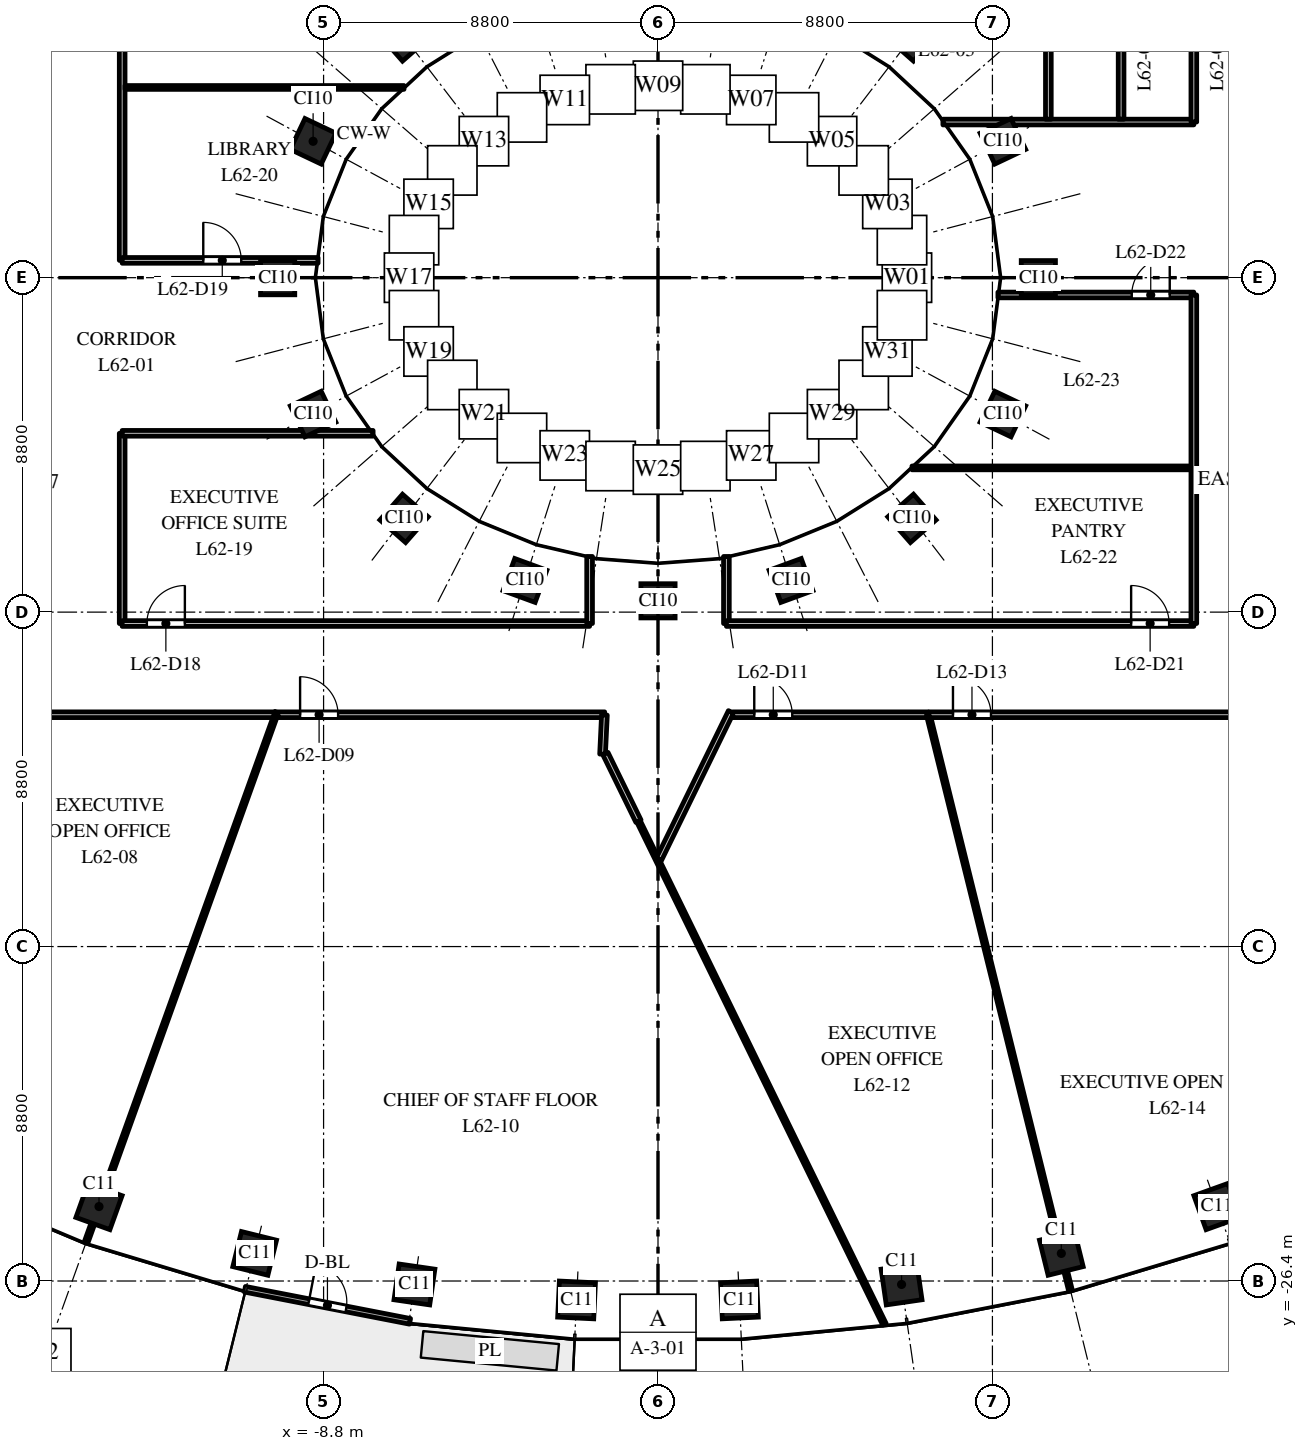
"""IFC4 building model, lengths in metres.
Left out: names, types, materials, properties, quantities, classifications, styles, units other than length and angle.
Written with IfcOpenShell. Run it as: python <this file> out.ifc"""

import sys

from ifc_helpers import new_model, si_unit, direction, frame, frame_2d, origin, origin_2d, place, context, subcontext, project, spatial, rectangle, extrude, element, fill, save


model = new_model("IFC4")
c1 = context("Model", 3, precision=1e-05, world=origin(), true_north=direction((0.0, 1.0)))
c2 = subcontext(c1, "Body", "Model", "MODEL_VIEW")
j1 = project(units=[si_unit("LENGTHUNIT", "METRE"), si_unit("PLANEANGLEUNIT", "RADIAN")], contexts=[c1])
p1 = place(None, origin())
s1 = spatial("IfcSite", under=j1, at=p1, CompositionType="ELEMENT")
p2 = place(p1, origin())
s2 = spatial("IfcBuilding", under=s1, at=p2, CompositionType="ELEMENT")
p3 = place(p2, frame((0.0, 0.0, 291.0)))
s3 = spatial("IfcBuildingStorey", under=s2, at=p3, CompositionType="ELEMENT", Elevation=291.0)
for number, where, z_axis, x_axis in (
    (1, (-14.709, -24.441, 0.0), (0.0, 0.0, 1.0), (0.941, -0.338, 0.0)),
    (2, (-10.613, -25.674, 0.0), (0.0, 0.0, 1.0), (0.971, -0.24, 0.0)),
    (3, (-6.409, -26.491, 0.0), (0.0, 0.0, 1.0), (0.99, -0.143, 0.0)),
    (4, (-2.143, -26.898, 0.0), (0.0, 0.0, 1.0), (0.999, -0.048, 0.0)),
    (5, (2.143, -26.898, 0.0), (0.0, 0.0, 1.0), (0.999, 0.048, 0.0)),
    (6, (6.409, -26.491, 0.0), (0.0, 0.0, 1.0), (0.99, 0.143, 0.0)),
    (7, (10.613, -25.674, 0.0), (0.0, 0.0, 1.0), (0.971, 0.24, 0.0)),
    (8, (14.709, -24.441, 0.0), (0.0, 0.0, 1.0), (0.941, 0.338, 0.0)),
):
    element("IfcColumn", number, at=place(p3, frame(where, z_axis=z_axis, x_axis=x_axis)), inside=s3, PredefinedType="COLUMN", context=c2, shape_type="SweptSolid", body=[
        extrude(rectangle(XDim=0.95, YDim=0.95, at=origin_2d()), origin(), (0.0, 0.0, 1.0), 4.0),
    ])
for number, where, z_axis, x_axis in (
    (9, (10.008, 0.0, 0.0), (0.0, 0.0, 1.0), (0.0, 1.0, 0.0)),
    (10, (9.076, 3.588, 0.0), (0.0, 0.0, 1.0), (-0.429, 0.903, 0.0)),
    (11, (6.682, 6.334, 0.0), (0.0, 0.0, 1.0), (-0.751, 0.66, 0.0)),
    (12, (-6.682, 6.334, 0.0), (0.0, 0.0, 1.0), (-0.751, -0.66, 0.0)),
    (13, (-9.076, 3.588, 0.0), (0.0, 0.0, 1.0), (-0.429, -0.903, 0.0)),
    (14, (-10.008, 0.0, 0.0), (0.0, 0.0, 1.0), (0.0, -1.0, 0.0)),
    (15, (-9.076, -3.588, 0.0), (0.0, 0.0, 1.0), (0.429, -0.903, 0.0)),
    (16, (-6.682, -6.334, 0.0), (0.0, 0.0, 1.0), (0.751, -0.66, 0.0)),
    (17, (-3.501, -7.967, 0.0), (0.0, 0.0, 1.0), (0.939, -0.344, 0.0)),
    (18, (0.0, -8.503, 0.0), (0.0, 0.0, 1.0), (1.0, 0.0, 0.0)),
    (19, (3.501, -7.967, 0.0), (0.0, 0.0, 1.0), (0.939, 0.344, 0.0)),
    (20, (6.682, -6.334, 0.0), (0.0, 0.0, 1.0), (0.751, 0.66, 0.0)),
    (21, (9.076, -3.588, 0.0), (0.0, 0.0, 1.0), (0.429, 0.903, 0.0)),
):
    element("IfcColumn", number, at=place(p3, frame(where, z_axis=z_axis, x_axis=x_axis)), inside=s3, PredefinedType="COLUMN", context=c2, shape_type="SweptSolid", body=[
        extrude(rectangle(XDim=0.9, YDim=0.9, at=origin_2d()), origin(), (0.0, 0.0, 1.0), 4.0),
    ])
p4 = place(p3, frame((-10.871, -26.617, 0.0), z_axis=(0.0, 0.0, 1.0), x_axis=(0.981631174778, -0.190788460615, 0.0)))
e22 = element("IfcWall", 22, at=p4, inside=s3, PredefinedType="STANDARD", context=c2, shape_type="SweptSolid", body=[
    extrude(rectangle(XDim=4.426, YDim=0.15, at=frame_2d((2.213, 0.0))), origin(), (0.0, 0.0, 1.0), 3.7),
])
p5 = place(p4, frame((1.713, 0.0, 0.0)))
e23 = element("IfcOpeningElement", 23, at=p5, cuts=e22, PredefinedType="OPENING", context=c2, shape_type="SweptSolid", body=[
    extrude(rectangle(XDim=1.0, YDim=2.4, at=frame_2d((0.5, 1.2))), frame((0.0, 0.085, 0.0), z_axis=(0.0, -1.0, 0.0), x_axis=(1.0, 0.0, 0.0)), (0.0, 0.0, 1.0), 0.17),
])
p6 = place(p3, frame((-31.5, -11.5, 0.0), z_axis=(0.0, 0.0, 1.0), x_axis=(1.0, 0.0, 0.0)))
e24 = element("IfcWall", 24, at=p6, inside=s3, PredefinedType="PARTITIONING", context=c2, shape_type="SweptSolid", body=[
    extrude(rectangle(XDim=21.432, YDim=0.15, at=frame_2d((10.716, 0.0))), origin(), (0.0, 0.0, 1.0), 2.75),
])
p7 = place(p6, frame((9.15, 0.0, 0.0)))
e25 = element("IfcOpeningElement", 25, at=p7, cuts=e24, PredefinedType="OPENING", context=c2, shape_type="SweptSolid", body=[
    extrude(rectangle(XDim=1.0, YDim=2.1, at=frame_2d((0.5, 1.05))), frame((0.0, 0.085, 0.0), z_axis=(0.0, -1.0, 0.0), x_axis=(1.0, 0.0, 0.0)), (0.0, 0.0, 1.0), 0.17),
])
p8 = place(p6, frame((12.021, 0.0, 0.0)))
e26 = element("IfcOpeningElement", 26, at=p8, cuts=e24, PredefinedType="OPENING", context=c2, shape_type="SweptSolid", body=[
    extrude(rectangle(XDim=1.0, YDim=2.1, at=frame_2d((0.5, 1.05))), frame((0.0, 0.085, 0.0), z_axis=(0.0, -1.0, 0.0), x_axis=(1.0, 0.0, 0.0)), (0.0, 0.0, 1.0), 0.17),
])
p9 = place(p3, frame((-15.049, -25.383, 0.0), z_axis=(0.0, 0.0, 1.0), x_axis=(0.338454781071, 0.94098265721, 0.0)))
e27 = element("IfcWall", 27, at=p9, inside=s3, PredefinedType="PARTITIONING", context=c2, shape_type="SweptSolid", body=[
    extrude(rectangle(XDim=14.829, YDim=0.1, at=frame_2d((7.415, 0.0))), origin(), (0.0, 0.0, 1.0), 2.75),
])
p10 = place(p3, frame((-14.1, -9.1, 0.0), z_axis=(0.0, 0.0, 1.0), x_axis=(0.0, 1.0, 0.0)))
e28 = element("IfcWall", 28, at=p10, inside=s3, PredefinedType="PARTITIONING", context=c2, shape_type="SweptSolid", body=[
    extrude(rectangle(XDim=5.005, YDim=0.15, at=frame_2d((2.502, 0.0))), origin(), (0.0, 0.0, 1.0), 3.7),
])
p11 = place(p3, frame((-14.1, -9.1, 0.0), z_axis=(0.0, 0.0, 1.0), x_axis=(1.0, 0.0, 0.0)))
e29 = element("IfcWall", 29, at=p11, inside=s3, PredefinedType="PARTITIONING", context=c2, shape_type="SweptSolid", body=[
    extrude(rectangle(XDim=12.3, YDim=0.15, at=frame_2d((6.15, 0.0))), origin(), (0.0, 0.0, 1.0), 2.75),
])
p12 = place(p11, frame((0.65, 0.0, 0.0)))
e30 = element("IfcOpeningElement", 30, at=p12, cuts=e29, PredefinedType="OPENING", context=c2, shape_type="SweptSolid", body=[
    extrude(rectangle(XDim=1.0, YDim=2.1, at=frame_2d((0.5, 1.05))), frame((0.0, 0.085, 0.0), z_axis=(0.0, -1.0, 0.0), x_axis=(1.0, 0.0, 0.0)), (0.0, 0.0, 1.0), 0.17),
])
p13 = place(p3, frame((-14.1, -4.095, 0.0), z_axis=(0.0, 0.0, 1.0), x_axis=(1.0, 0.0, 0.0)))
e31 = element("IfcWall", 31, at=p13, inside=s3, PredefinedType="PARTITIONING", context=c2, shape_type="SweptSolid", body=[
    extrude(rectangle(XDim=6.603, YDim=0.15, at=frame_2d((3.302, 0.0))), origin(), (0.0, 0.0, 1.0), 3.0),
])
p14 = place(p3, frame((-14.1, 0.455, 0.0), z_axis=(0.0, 0.0, 1.0), x_axis=(0.0, 1.0, 0.0)))
e32 = element("IfcWall", 32, at=p14, inside=s3, PredefinedType="PARTITIONING", context=c2, shape_type="SweptSolid", body=[
    extrude(rectangle(XDim=8.645, YDim=0.15, at=frame_2d((4.323, 0.0))), origin(), (0.0, 0.0, 1.0), 3.7),
])
p15 = place(p3, frame((-14.1, 0.455, 0.0), z_axis=(0.0, 0.0, 1.0), x_axis=(1.0, 0.0, 0.0)))
e33 = element("IfcWall", 33, at=p15, inside=s3, PredefinedType="PARTITIONING", context=c2, shape_type="SweptSolid", body=[
    extrude(rectangle(XDim=5.155, YDim=0.15, at=frame_2d((2.578, 0.0))), origin(), (0.0, 0.0, 1.0), 3.0),
])
p16 = place(p15, frame((2.134, 0.0, 0.0)))
e34 = element("IfcOpeningElement", 34, at=p16, cuts=e33, PredefinedType="OPENING", context=c2, shape_type="SweptSolid", body=[
    extrude(rectangle(XDim=1.0, YDim=2.1, at=frame_2d((0.5, 1.05))), frame((0.0, 0.085, 0.0), z_axis=(0.0, -1.0, 0.0), x_axis=(1.0, 0.0, 0.0)), (0.0, 0.0, 1.0), 0.17),
])
p17 = place(p3, frame((-14.025, 5.005, 0.0), z_axis=(0.0, 0.0, 1.0), x_axis=(1.0, 0.0, 0.0)))
e35 = element("IfcWall", 35, at=p17, inside=s3, PredefinedType="PARTITIONING", context=c2, shape_type="SweptSolid", body=[
    extrude(rectangle(XDim=7.341, YDim=0.1, at=frame_2d((3.67, 0.0))), origin(), (0.0, 0.0, 1.0), 3.0),
])
p18 = place(p3, frame((-10.003, -11.5, 0.0), z_axis=(0.0, 0.0, 1.0), x_axis=(1.0, 0.0, 0.0)))
e36 = element("IfcWall", 36, at=p18, inside=s3, PredefinedType="PARTITIONING", context=c2, shape_type="SweptSolid", body=[
    extrude(rectangle(XDim=8.6, YDim=0.15, at=frame_2d((4.3, 0.0))), origin(), (0.0, 0.0, 1.0), 2.75),
])
p19 = place(p18, frame((0.585, 0.0, 0.0)))
e37 = element("IfcOpeningElement", 37, at=p19, cuts=e36, PredefinedType="OPENING", context=c2, shape_type="SweptSolid", body=[
    extrude(rectangle(XDim=1.0, YDim=2.1, at=frame_2d((0.5, 1.05))), frame((0.0, 0.085, 0.0), z_axis=(0.0, -1.0, 0.0), x_axis=(1.0, 0.0, 0.0)), (0.0, 0.0, 1.0), 0.17),
])
p20 = place(p3, frame((-1.8, -9.1, 0.0), z_axis=(0.0, 0.0, 1.0), x_axis=(0.0, 1.0, 0.0)))
e38 = element("IfcWall", 38, at=p20, inside=s3, PredefinedType="PARTITIONING", context=c2, shape_type="SweptSolid", body=[
    extrude(rectangle(XDim=1.764, YDim=0.15, at=frame_2d((0.882, 0.0))), origin(), (0.0, 0.0, 1.0), 3.0),
])
p21 = place(p3, frame((-1.459, -12.538, 0.0), z_axis=(0.0, 0.0, 1.0), x_axis=(0.047542673634, 0.998869207746, 0.0)))
e39 = element("IfcWall", 39, at=p21, inside=s3, PredefinedType="PARTITIONING", context=c2, shape_type="SweptSolid", body=[
    extrude(rectangle(XDim=1.032, YDim=0.15, at=frame_2d((0.516, 0.0))), origin(), (0.0, 0.0, 1.0), 3.7),
])
p22 = place(p3, frame((-1.384, -12.522, 0.0), z_axis=(0.0, 0.0, 1.0), x_axis=(0.439356052892, -0.898313007134, 0.0)))
e40 = element("IfcWall", 40, at=p22, inside=s3, PredefinedType="PARTITIONING", context=c2, shape_type="SweptSolid", body=[
    extrude(rectangle(XDim=1.98, YDim=0.15, at=frame_2d((0.99, 0.0))), origin(), (0.0, 0.0, 1.0), 2.85),
])
p23 = place(p3, frame((-0.511, -14.307, 0.0), z_axis=(0.0, 0.0, 1.0), x_axis=(0.439232430121, -0.898373459275, 0.0)))
e41 = element("IfcWall", 41, at=p23, inside=s3, PredefinedType="PARTITIONING", context=c2, shape_type="SweptSolid", body=[
    extrude(rectangle(XDim=14.728, YDim=0.1, at=frame_2d((7.364, 0.0))), origin(), (0.0, 0.0, 1.0), 3.0),
])
p24 = place(p3, frame((0.022, -15.308, 0.0), z_axis=(0.0, 0.0, 1.0), x_axis=(0.439129080874, 0.898423981387, 0.0)))
e42 = element("IfcWall", 42, at=p24, inside=s3, PredefinedType="PARTITIONING", context=c2, shape_type="SweptSolid", body=[
    extrude(rectangle(XDim=4.322, YDim=0.15, at=frame_2d((2.161, 0.0))), origin(), (0.0, 0.0, 1.0), 3.7),
])
p25 = place(p3, frame((1.8, -9.1, 0.0), z_axis=(0.0, 0.0, 1.0), x_axis=(0.0, 1.0, 0.0)))
e43 = element("IfcWall", 43, at=p25, inside=s3, PredefinedType="PARTITIONING", context=c2, shape_type="SweptSolid", body=[
    extrude(rectangle(XDim=1.764, YDim=0.15, at=frame_2d((0.882, 0.0))), origin(), (0.0, 0.0, 1.0), 3.0),
])
p26 = place(p3, frame((1.8, -9.1, 0.0), z_axis=(0.0, 0.0, 1.0), x_axis=(1.0, 0.0, 0.0)))
e44 = element("IfcWall", 44, at=p26, inside=s3, PredefinedType="PARTITIONING", context=c2, shape_type="SweptSolid", body=[
    extrude(rectangle(XDim=12.3, YDim=0.15, at=frame_2d((6.15, 0.0))), origin(), (0.0, 0.0, 1.0), 2.85),
])
p27 = place(p26, frame((10.65, 0.0, 0.0)))
e45 = element("IfcOpeningElement", 45, at=p27, cuts=e44, PredefinedType="OPENING", context=c2, shape_type="SweptSolid", body=[
    extrude(rectangle(XDim=1.0, YDim=2.1, at=frame_2d((0.5, 1.05))), frame((0.0, 0.085, 0.0), z_axis=(0.0, -1.0, 0.0), x_axis=(1.0, 0.0, 0.0)), (0.0, 0.0, 1.0), 0.17),
])
p28 = place(p3, frame((1.966, -11.5, 0.0), z_axis=(0.0, 0.0, 1.0), x_axis=(1.0, 0.0, 0.0)))
e46 = element("IfcWall", 46, at=p28, inside=s3, PredefinedType="PARTITIONING", context=c2, shape_type="SweptSolid", body=[
    extrude(rectangle(XDim=5.146, YDim=0.15, at=frame_2d((2.573, 0.0))), origin(), (0.0, 0.0, 1.0), 2.85),
])
p29 = place(p28, frame((0.567, 0.0, 0.0)))
e47 = element("IfcOpeningElement", 47, at=p29, cuts=e46, PredefinedType="OPENING", context=c2, shape_type="SweptSolid", body=[
    extrude(rectangle(XDim=1.0, YDim=2.1, at=frame_2d((0.5, 1.05))), frame((0.0, 0.085, 0.0), z_axis=(0.0, -1.0, 0.0), x_axis=(1.0, 0.0, 0.0)), (0.0, 0.0, 1.0), 0.17),
])
p30 = place(p3, frame((6.684, -5.005, 0.0), z_axis=(0.0, 0.0, 1.0), x_axis=(1.0, 0.0, 0.0)))
e48 = element("IfcWall", 48, at=p30, inside=s3, PredefinedType="PARTITIONING", context=c2, shape_type="SweptSolid", body=[
    extrude(rectangle(XDim=7.341, YDim=0.1, at=frame_2d((3.67, 0.0))), origin(), (0.0, 0.0, 1.0), 2.75),
])
p31 = place(p3, frame((7.112, -11.5, 0.0), z_axis=(0.0, 0.0, 1.0), x_axis=(0.239787813873, -0.970825321218, 0.0)))
e49 = element("IfcWall", 49, at=p31, inside=s3, PredefinedType="PARTITIONING", context=c2, shape_type="SweptSolid", body=[
    extrude(rectangle(XDim=15.601, YDim=0.1, at=frame_2d((7.801, 0.0))), origin(), (0.0, 0.0, 1.0), 2.85),
])
p32 = place(p3, frame((7.129, -11.5, 0.0), z_axis=(0.0, 0.0, 1.0), x_axis=(1.0, 0.0, 0.0)))
e50 = element("IfcWall", 50, at=p32, inside=s3, PredefinedType="PARTITIONING", context=c2, shape_type="SweptSolid", body=[
    extrude(rectangle(XDim=24.371, YDim=0.15, at=frame_2d((12.186, 0.0))), origin(), (0.0, 0.0, 1.0), 2.75),
])
p33 = place(p32, frame((0.633, 0.0, 0.0)))
e51 = element("IfcOpeningElement", 51, at=p33, cuts=e50, PredefinedType="OPENING", context=c2, shape_type="SweptSolid", body=[
    extrude(rectangle(XDim=1.0, YDim=2.1, at=frame_2d((0.5, 1.05))), frame((0.0, 0.085, 0.0), z_axis=(0.0, -1.0, 0.0), x_axis=(1.0, 0.0, 0.0)), (0.0, 0.0, 1.0), 0.17),
])
p34 = place(p32, frame((10.195, 0.0, 0.0)))
e52 = element("IfcOpeningElement", 52, at=p34, cuts=e50, PredefinedType="OPENING", context=c2, shape_type="SweptSolid", body=[
    extrude(rectangle(XDim=1.0, YDim=2.1, at=frame_2d((0.5, 1.05))), frame((0.0, 0.085, 0.0), z_axis=(0.0, -1.0, 0.0), x_axis=(1.0, 0.0, 0.0)), (0.0, 0.0, 1.0), 0.17),
])
p35 = place(p3, frame((7.497, 4.095, 0.0), z_axis=(0.0, 0.0, 1.0), x_axis=(1.0, 0.0, 0.0)))
e53 = element("IfcWall", 53, at=p35, inside=s3, PredefinedType="PARTITIONING", context=c2, shape_type="SweptSolid", body=[
    extrude(rectangle(XDim=6.603, YDim=0.15, at=frame_2d((3.302, 0.0))), origin(), (0.0, 0.0, 1.0), 3.0),
])
p36 = place(p3, frame((8.945, -0.455, 0.0), z_axis=(0.0, 0.0, 1.0), x_axis=(1.0, 0.0, 0.0)))
e54 = element("IfcWall", 54, at=p36, inside=s3, PredefinedType="PARTITIONING", context=c2, shape_type="SweptSolid", body=[
    extrude(rectangle(XDim=5.155, YDim=0.15, at=frame_2d((2.578, 0.0))), origin(), (0.0, 0.0, 1.0), 3.0),
])
p37 = place(p36, frame((3.521, 0.0, 0.0)))
e55 = element("IfcOpeningElement", 55, at=p37, cuts=e54, PredefinedType="OPENING", context=c2, shape_type="SweptSolid", body=[
    extrude(rectangle(XDim=1.0, YDim=2.1, at=frame_2d((0.5, 1.05))), frame((0.0, 0.085, 0.0), z_axis=(0.0, -1.0, 0.0), x_axis=(1.0, 0.0, 0.0)), (0.0, 0.0, 1.0), 0.17),
])
for number, where, z_axis, x_axis in (
    (56, (10.272, 4.17, 0.0), (0.0, 0.0, 1.0), (0.0, 1.0, 0.0)),
    (57, (12.186, 4.17, 0.0), (0.0, 0.0, 1.0), (0.0, 1.0, 0.0)),
):
    element("IfcWall", number, at=place(p3, frame(where, z_axis=z_axis, x_axis=x_axis)), inside=s3, PredefinedType="PARTITIONING", context=c2, shape_type="SweptSolid", body=[
        extrude(rectangle(XDim=2.955, YDim=0.15, at=frame_2d((1.478, 0.0))), origin(), (0.0, 0.0, 1.0), 2.75),
    ])
p38 = place(p3, frame((14.1, -9.1, 0.0), z_axis=(0.0, 0.0, 1.0), x_axis=(0.0, 1.0, 0.0)))
e58 = element("IfcWall", 58, at=p38, inside=s3, PredefinedType="PARTITIONING", context=c2, shape_type="SweptSolid", body=[
    extrude(rectangle(XDim=8.645, YDim=0.15, at=frame_2d((4.323, 0.0))), origin(), (0.0, 0.0, 1.0), 2.75),
])
p39 = place(p3, frame((14.1, 4.095, 0.0), z_axis=(0.0, 0.0, 1.0), x_axis=(0.0, 1.0, 0.0)))
e59 = element("IfcWall", 59, at=p39, inside=s3, PredefinedType="PARTITIONING", context=c2, shape_type="SweptSolid", body=[
    extrude(rectangle(XDim=5.005, YDim=0.15, at=frame_2d((2.502, 0.0))), origin(), (0.0, 0.0, 1.0), 2.75),
])
p40 = place(p5, origin())
e60 = element("IfcDoor", 60, at=p40, inside=s3, OperationType="SINGLE_SWING_LEFT", PredefinedType="DOOR", context=c2, shape_type="SweptSolid", body=[
    extrude(rectangle(XDim=1.0, YDim=2.4, at=frame_2d((0.5, 1.2))), frame((0.0, 0.025, 0.0), z_axis=(0.0, -1.0, 0.0), x_axis=(1.0, 0.0, 0.0)), (0.0, 0.0, 1.0), 0.05),
])
fill(e23, e60)
p41 = place(p19, origin())
e61 = element("IfcDoor", 61, at=p41, inside=s3, OperationType="SINGLE_SWING_LEFT", PredefinedType="DOOR", context=c2, shape_type="SweptSolid", body=[
    extrude(rectangle(XDim=1.0, YDim=2.1, at=frame_2d((0.5, 1.05))), frame((0.0, 0.025, 0.0), z_axis=(0.0, -1.0, 0.0), x_axis=(1.0, 0.0, 0.0)), (0.0, 0.0, 1.0), 0.05),
])
fill(e37, e61)
p42 = place(p29, origin())
e62 = element("IfcDoor", 62, at=p42, inside=s3, OperationType="SINGLE_SWING_LEFT", PredefinedType="DOOR", context=c2, shape_type="SweptSolid", body=[
    extrude(rectangle(XDim=1.0, YDim=2.1, at=frame_2d((0.5, 1.05))), frame((0.0, 0.025, 0.0), z_axis=(0.0, -1.0, 0.0), x_axis=(1.0, 0.0, 0.0)), (0.0, 0.0, 1.0), 0.05),
])
fill(e47, e62)
p43 = place(p33, origin())
e63 = element("IfcDoor", 63, at=p43, inside=s3, OperationType="SINGLE_SWING_LEFT", PredefinedType="DOOR", context=c2, shape_type="SweptSolid", body=[
    extrude(rectangle(XDim=1.0, YDim=2.1, at=frame_2d((0.5, 1.05))), frame((0.0, 0.025, 0.0), z_axis=(0.0, -1.0, 0.0), x_axis=(1.0, 0.0, 0.0)), (0.0, 0.0, 1.0), 0.05),
])
fill(e51, e63)
p44 = place(p12, origin())
e64 = element("IfcDoor", 64, at=p44, inside=s3, OperationType="SINGLE_SWING_RIGHT", PredefinedType="DOOR", context=c2, shape_type="SweptSolid", body=[
    extrude(rectangle(XDim=1.0, YDim=2.1, at=frame_2d((0.5, 1.05))), frame((0.0, 0.025, 0.0), z_axis=(0.0, -1.0, 0.0), x_axis=(1.0, 0.0, 0.0)), (0.0, 0.0, 1.0), 0.05),
])
fill(e30, e64)
p45 = place(p16, origin())
e65 = element("IfcDoor", 65, at=p45, inside=s3, OperationType="SINGLE_SWING_LEFT", PredefinedType="DOOR", context=c2, shape_type="SweptSolid", body=[
    extrude(rectangle(XDim=1.0, YDim=2.1, at=frame_2d((0.5, 1.05))), frame((0.0, 0.025, 0.0), z_axis=(0.0, -1.0, 0.0), x_axis=(1.0, 0.0, 0.0)), (0.0, 0.0, 1.0), 0.05),
])
fill(e34, e65)
p46 = place(p27, origin())
e66 = element("IfcDoor", 66, at=p46, inside=s3, OperationType="SINGLE_SWING_LEFT", PredefinedType="DOOR", context=c2, shape_type="SweptSolid", body=[
    extrude(rectangle(XDim=1.0, YDim=2.1, at=frame_2d((0.5, 1.05))), frame((0.0, 0.025, 0.0), z_axis=(0.0, -1.0, 0.0), x_axis=(1.0, 0.0, 0.0)), (0.0, 0.0, 1.0), 0.05),
])
fill(e45, e66)
p47 = place(p37, origin())
e67 = element("IfcDoor", 67, at=p47, inside=s3, OperationType="SINGLE_SWING_RIGHT", PredefinedType="DOOR", context=c2, shape_type="SweptSolid", body=[
    extrude(rectangle(XDim=1.0, YDim=2.1, at=frame_2d((0.5, 1.05))), frame((0.0, 0.025, 0.0), z_axis=(0.0, -1.0, 0.0), x_axis=(1.0, 0.0, 0.0)), (0.0, 0.0, 1.0), 0.05),
])
fill(e55, e67)
save(model, sys.argv[1])
